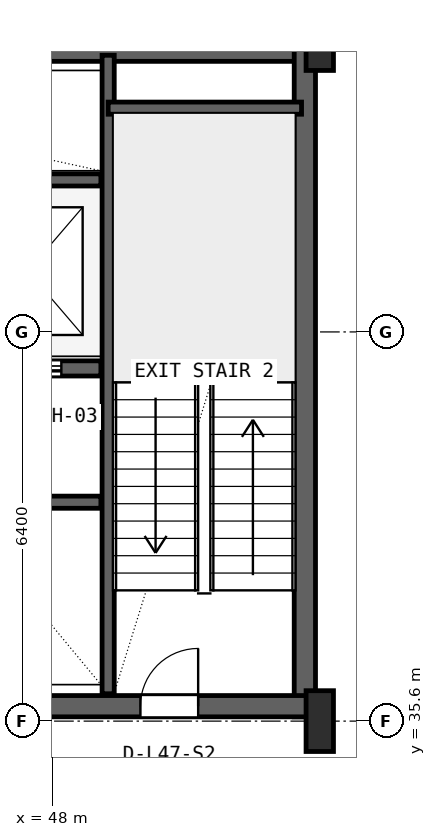
"""IFC4 building model, lengths in metres.
Left out: names, types, materials, properties, quantities, classifications, styles, units other than length and angle.
Written with IfcOpenShell. Run it as: python <this file> out.ifc"""

import sys

from ifc_helpers import new_model, si_unit, direction, frame, frame_2d, origin, origin_2d, place, context, subcontext, project, spatial, rectangle, i_section, extrude, source, transform, mapped, element, fill, save


model = new_model("IFC4")
c1 = context("Model", 3, precision=1e-05, world=origin(), true_north=direction((0.0, 1.0)))
c2 = subcontext(c1, "Body", "Model", "MODEL_VIEW")
j1 = project(units=[si_unit("LENGTHUNIT", "METRE"), si_unit("PLANEANGLEUNIT", "RADIAN")], contexts=[c1])
p1 = place(None, origin())
s1 = spatial("IfcSite", under=j1, at=p1, CompositionType="ELEMENT")
p2 = place(p1, origin())
s2 = spatial("IfcBuilding", under=s1, at=p2, CompositionType="ELEMENT")
p3 = place(p2, frame((0.0, 0.0, 191.4)))
s3 = spatial("IfcBuildingStorey", under=s2, at=p3, CompositionType="ELEMENT", Elevation=191.4)
p4 = place(p3, frame((15.6, 46.625, 0.0), z_axis=(0.0, 0.0, 1.0), x_axis=(1.0, 0.0, 0.0)))
e1 = element("IfcWall", 1, at=p4, inside=s3, PredefinedType="SHEAR", context=c2, shape_type="SweptSolid", body=[
    extrude(rectangle(XDim=36.8, YDim=0.35, at=frame_2d((18.4, 0.0))), origin(), (0.0, 0.0, 1.0), 4.35),
])
p5 = place(p3, frame((52.155, 35.67, 0.0), z_axis=(0.0, 0.0, 1.0), x_axis=(0.0, 1.0, 0.0)))
e2 = element("IfcWall", 2, at=p5, inside=s3, PredefinedType="SHEAR", context=c2, shape_type="SweptSolid", body=[
    extrude(rectangle(XDim=11.13, YDim=0.35, at=frame_2d((5.565, 0.0))), origin(), (0.0, 0.0, 1.0), 4.35),
])
p6 = place(p3, frame((43.2, 35.845, 0.0), z_axis=(0.0, 0.0, 1.0), x_axis=(1.0, 0.0, 0.0)))
e3 = element("IfcWall", 3, at=p6, inside=s3, PredefinedType="SHEAR", context=c2, shape_type="SweptSolid", body=[
    extrude(rectangle(XDim=9.13, YDim=0.35, at=frame_2d((4.565, 0.0))), origin(), (0.0, 0.0, 1.0), 4.35),
])
p7 = place(p6, frame((6.25, 0.0, 0.0)))
e4 = element("IfcOpeningElement", 4, at=p7, cuts=e3, PredefinedType="OPENING", context=c2, shape_type="SweptSolid", body=[
    extrude(rectangle(XDim=0.95, YDim=2.1, at=frame_2d((0.475, 1.05))), frame((0.0, 0.185, 0.0), z_axis=(0.0, -1.0, 0.0), x_axis=(1.0, 0.0, 0.0)), (0.0, 0.0, 1.0), 0.37),
])
m1 = source(origin(), c2, "Body", "SweptSolid", [
    extrude(i_section(OverallWidth=0.45, OverallDepth=1.0, WebThickness=0.016, FlangeThickness=0.03, FilletRadius=0.016, at=origin_2d()), origin(), (0.0, 0.0, 1.0), 4.6),
])
for number, where, z_axis, x_axis in (
    (5, (52.4, 35.6, 0.0), (0.0, 0.0, 1.0), (1.0, 0.0, 0.0)),
    (6, (52.4, 46.8, 0.0), (0.0, 0.0, 1.0), (1.0, 0.0, 0.0)),
):
    element("IfcColumn", number, at=place(p3, frame(where, z_axis=z_axis, x_axis=x_axis)), inside=s3, PredefinedType="COLUMN", context=c2, shape_type="MappedRepresentation", body=[
        mapped(m1, transform((0.0, 0.0, 0.0), x_axis=(1.0, 0.0, 0.0), y_axis=(0.0, 1.0, 0.0), z_axis=(0.0, 0.0, 1.0), scale=1.0)),
    ])
p8 = place(p3, frame((48.92, 36.05, 0.0), z_axis=(0.0, 0.0, 1.0), x_axis=(0.0, 1.0, 0.0)))
e7 = element("IfcWall", 7, at=p8, inside=s3, PredefinedType="SHEAR", context=c2, shape_type="SweptSolid", body=[
    extrude(rectangle(XDim=10.5, YDim=0.2, at=frame_2d((5.25, 0.0))), origin(), (0.0, 0.0, 1.0), 4.35),
])
p9 = place(p3, frame((48.92, 45.68, 0.0), z_axis=(0.0, 0.0, 1.0), x_axis=(1.0, 0.0, 0.0)))
e8 = element("IfcWall", 8, at=p9, inside=s3, PredefinedType="SHEAR", context=c2, shape_type="SweptSolid", body=[
    extrude(rectangle(XDim=3.18, YDim=0.2, at=frame_2d((1.59, 0.0))), origin(), (0.0, 0.0, 1.0), 4.35),
])
p10 = place(p3, frame((24.98, 41.4, 0.0), z_axis=(0.0, 0.0, 1.0), x_axis=(1.0, 0.0, 0.0)))
e9 = element("IfcWall", 9, at=p10, inside=s3, PredefinedType="SHEAR", context=c2, shape_type="SweptSolid", body=[
    extrude(rectangle(XDim=23.82, YDim=0.25, at=frame_2d((11.91, 0.0))), origin(), (0.0, 0.0, 1.0), 4.35),
])
p11 = place(p10, frame((8.87, 0.0, 0.0)))
e10 = element("IfcOpeningElement", 10, at=p11, cuts=e9, PredefinedType="OPENING", context=c2, shape_type="SweptSolid", body=[
    extrude(rectangle(XDim=1.1, YDim=2.18, at=frame_2d((0.55, 1.09))), frame((0.0, 0.135, 0.0), z_axis=(0.0, -1.0, 0.0), x_axis=(1.0, 0.0, 0.0)), (0.0, 0.0, 1.0), 0.27),
])
p12 = place(p10, frame((11.47, 0.0, 0.0)))
e11 = element("IfcOpeningElement", 11, at=p12, cuts=e9, PredefinedType="OPENING", context=c2, shape_type="SweptSolid", body=[
    extrude(rectangle(XDim=1.1, YDim=2.18, at=frame_2d((0.55, 1.09))), frame((0.0, 0.135, 0.0), z_axis=(0.0, -1.0, 0.0), x_axis=(1.0, 0.0, 0.0)), (0.0, 0.0, 1.0), 0.27),
])
p13 = place(p10, frame((14.07, 0.0, 0.0)))
e12 = element("IfcOpeningElement", 12, at=p13, cuts=e9, PredefinedType="OPENING", context=c2, shape_type="SweptSolid", body=[
    extrude(rectangle(XDim=1.1, YDim=2.18, at=frame_2d((0.55, 1.09))), frame((0.0, 0.135, 0.0), z_axis=(0.0, -1.0, 0.0), x_axis=(1.0, 0.0, 0.0)), (0.0, 0.0, 1.0), 0.27),
])
p14 = place(p10, frame((16.87, 0.0, 0.0)))
e13 = element("IfcOpeningElement", 13, at=p14, cuts=e9, PredefinedType="OPENING", context=c2, shape_type="SweptSolid", body=[
    extrude(rectangle(XDim=1.1, YDim=2.18, at=frame_2d((0.55, 1.09))), frame((0.0, 0.135, 0.0), z_axis=(0.0, -1.0, 0.0), x_axis=(1.0, 0.0, 0.0)), (0.0, 0.0, 1.0), 0.27),
])
p15 = place(p10, frame((19.47, 0.0, 0.0)))
e14 = element("IfcOpeningElement", 14, at=p15, cuts=e9, PredefinedType="OPENING", context=c2, shape_type="SweptSolid", body=[
    extrude(rectangle(XDim=1.1, YDim=2.18, at=frame_2d((0.55, 1.09))), frame((0.0, 0.135, 0.0), z_axis=(0.0, -1.0, 0.0), x_axis=(1.0, 0.0, 0.0)), (0.0, 0.0, 1.0), 0.27),
])
p16 = place(p10, frame((22.07, 0.0, 0.0)))
e15 = element("IfcOpeningElement", 15, at=p16, cuts=e9, PredefinedType="OPENING", context=c2, shape_type="SweptSolid", body=[
    extrude(rectangle(XDim=1.1, YDim=2.18, at=frame_2d((0.55, 1.09))), frame((0.0, 0.135, 0.0), z_axis=(0.0, -1.0, 0.0), x_axis=(1.0, 0.0, 0.0)), (0.0, 0.0, 1.0), 0.27),
])
p17 = place(p10, frame((0.96, 0.0, 0.0)))
e16 = element("IfcOpeningElement", 16, at=p17, cuts=e9, PredefinedType="OPENING", context=c2, shape_type="SweptSolid", body=[
    extrude(rectangle(XDim=1.0, YDim=2.08, at=frame_2d((0.5, 1.04))), frame((0.0, 0.135, 0.0), z_axis=(0.0, -1.0, 0.0), x_axis=(1.0, 0.0, 0.0)), (0.0, 0.0, 1.0), 0.27),
])
p18 = place(p10, frame((3.56, 0.0, 0.0)))
e17 = element("IfcOpeningElement", 17, at=p18, cuts=e9, PredefinedType="OPENING", context=c2, shape_type="SweptSolid", body=[
    extrude(rectangle(XDim=1.0, YDim=2.08, at=frame_2d((0.5, 1.04))), frame((0.0, 0.135, 0.0), z_axis=(0.0, -1.0, 0.0), x_axis=(1.0, 0.0, 0.0)), (0.0, 0.0, 1.0), 0.27),
])
p19 = place(p10, frame((6.16, 0.0, 0.0)))
e18 = element("IfcOpeningElement", 18, at=p19, cuts=e9, PredefinedType="OPENING", context=c2, shape_type="SweptSolid", body=[
    extrude(rectangle(XDim=0.92, YDim=2.08, at=frame_2d((0.46, 1.04))), frame((0.0, 0.135, 0.0), z_axis=(0.0, -1.0, 0.0), x_axis=(1.0, 0.0, 0.0)), (0.0, 0.0, 1.0), 0.27),
])
p20 = place(p3, frame((41.22, 44.5, 0.0), z_axis=(0.0, 0.0, 1.0), x_axis=(1.0, 0.0, 0.0)))
e19 = element("IfcWall", 19, at=p20, inside=s3, PredefinedType="SHEAR", context=c2, shape_type="SweptSolid", body=[
    extrude(rectangle(XDim=7.58, YDim=0.2, at=frame_2d((3.79, 0.0))), origin(), (0.0, 0.0, 1.0), 4.35),
])
p21 = place(p3, frame((43.65, 39.2, 0.0), z_axis=(0.0, 0.0, 1.0), x_axis=(1.0, 0.0, 0.0)))
e20 = element("IfcWall", 20, at=p21, inside=s3, PredefinedType="SHEAR", context=c2, shape_type="SweptSolid", body=[
    extrude(rectangle(XDim=5.15, YDim=0.2, at=frame_2d((2.575, 0.0))), origin(), (0.0, 0.0, 1.0), 4.35),
])
m2 = source(origin(), c2, "Body", "SweptSolid", [
    extrude(rectangle(XDim=0.95, YDim=2.1, at=frame_2d((0.475, 1.05))), frame((0.0, 0.025, 0.0), z_axis=(0.0, -1.0, 0.0), x_axis=(1.0, 0.0, 0.0)), (0.0, 0.0, 1.0), 0.05),
])
p22 = place(p7, origin())
e21 = element("IfcDoor", 21, at=p22, inside=s3, OperationType="SINGLE_SWING_RIGHT", PredefinedType="DOOR", context=c2, shape_type="MappedRepresentation", body=[
    mapped(m2, transform((0.0, 0.0, 0.0), x_axis=(1.0, 0.0, 0.0), y_axis=(0.0, 1.0, 0.0), z_axis=(0.0, 0.0, 1.0), scale=1.0)),
])
fill(e4, e21)
m3 = source(origin(), c2, "Body", "SweptSolid", [
    extrude(rectangle(XDim=1.1, YDim=2.18, at=frame_2d((0.55, 1.09))), frame((0.0, 0.025, 0.0), z_axis=(0.0, -1.0, 0.0), x_axis=(1.0, 0.0, 0.0)), (0.0, 0.0, 1.0), 0.05),
])
p23 = place(p16, frame((1.1, 0.0, 0.0), z_axis=(0.0, 0.0, 1.0), x_axis=(-1.0, 0.0, 0.0)))
e22 = element("IfcDoor", 22, at=p23, inside=s3, OperationType="SLIDING_TO_LEFT", PredefinedType="DOOR", context=c2, shape_type="MappedRepresentation", body=[
    mapped(m3, transform((0.0, 0.0, 0.0), x_axis=(1.0, 0.0, 0.0), y_axis=(0.0, 1.0, 0.0), z_axis=(0.0, 0.0, 1.0), scale=1.0)),
])
fill(e15, e22)
save(model, sys.argv[1])
